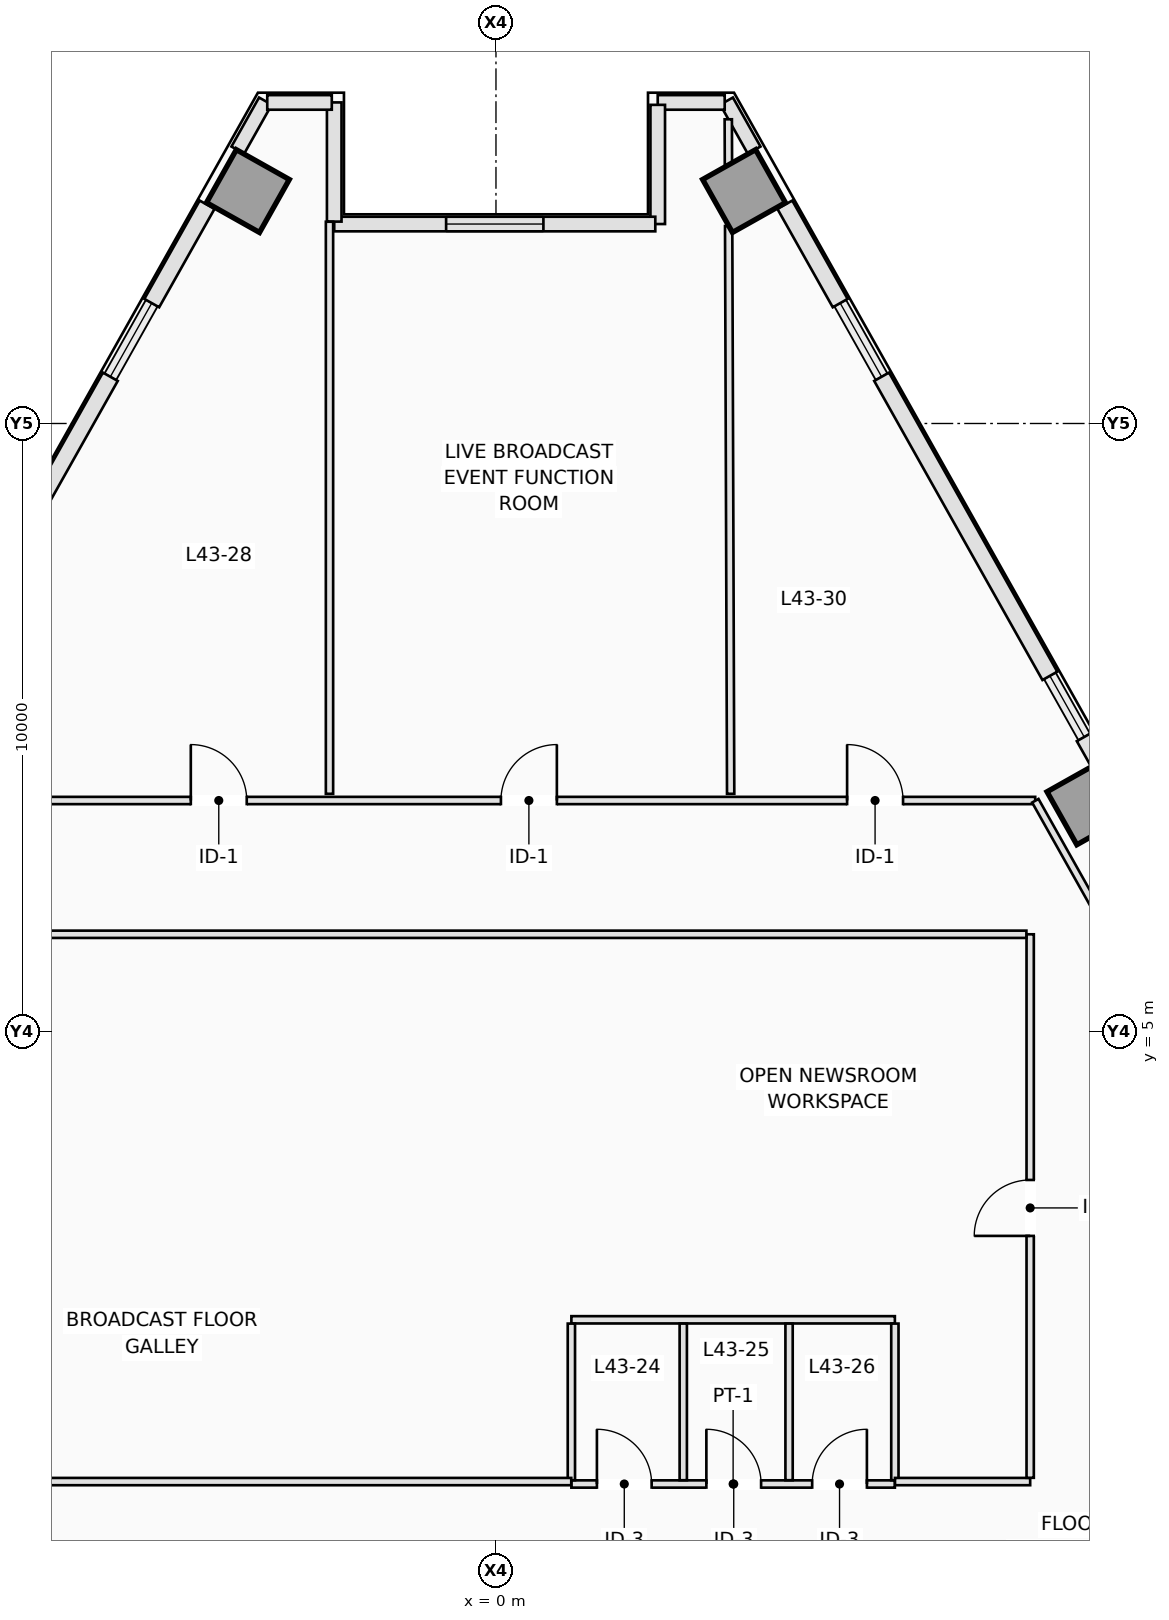
"""IFC4 building model, lengths in metres.
Left out: names, types, materials, properties, quantities, classifications, styles, units other than length and angle.
Written with IfcOpenShell. Run it as: python <this file> out.ifc"""

import sys

from ifc_helpers import new_model, si_unit, direction, frame, frame_2d, origin, origin_2d, place, context, subcontext, project, spatial, rectangle, extrude, element, fill, save


model = new_model("IFC4")
c1 = context("Model", 3, precision=1e-05, world=origin(), true_north=direction((0.0, 1.0)))
c2 = subcontext(c1, "Body", "Model", "MODEL_VIEW")
j1 = project(units=[si_unit("LENGTHUNIT", "METRE"), si_unit("PLANEANGLEUNIT", "RADIAN")], contexts=[c1])
p1 = place(None, origin())
s1 = spatial("IfcSite", under=j1, at=p1, CompositionType="ELEMENT")
p2 = place(p1, origin())
s2 = spatial("IfcBuilding", under=s1, at=p2, CompositionType="ELEMENT")
p3 = place(p2, frame((0.0, 0.0, 158.0)))
s3 = spatial("IfcBuildingStorey", under=s2, at=p3, CompositionType="ELEMENT", Elevation=158.0)
for number, where, z_axis, x_axis in (
    (1, (9.743, 8.753, 0.0), (0.0, 0.0, 1.0), (0.872, 0.49, 0.0)),
    (2, (4.079, 18.822, 0.0), (0.0, 0.0, 1.0), (0.872, 0.49, 0.0)),
    (3, (-4.079, 18.822, 0.0), (0.0, 0.0, 1.0), (-0.872, 0.49, 0.0)),
):
    element("IfcColumn", number, at=place(p3, frame(where, z_axis=z_axis, x_axis=x_axis)), inside=s3, PredefinedType="COLUMN", context=c2, shape_type="SweptSolid", body=[
        extrude(rectangle(XDim=1.0, YDim=1.0, at=origin_2d()), origin(), (0.0, 0.0, 1.0), 3.5),
    ])
p4 = place(p3, frame((3.792, 20.302, 0.0), z_axis=(0.0, 0.0, 1.0), x_axis=(0.490048346303, -0.871695255399, 0.0)))
e4 = element("IfcWall", 4, at=p4, inside=s3, PredefinedType="STANDARD", context=c2, shape_type="SweptSolid", body=[
    extrude(rectangle(XDim=0.926, YDim=0.24, at=frame_2d((0.463, 0.0))), origin(), (0.0, 0.0, 1.0), 3.25),
])
p5 = place(p3, frame((4.751, 18.597, 0.0), z_axis=(0.0, 0.0, 1.0), x_axis=(0.490248749158, -0.871582562899, 0.0)))
e5 = element("IfcWall", 5, at=p5, inside=s3, PredefinedType="STANDARD", context=c2, shape_type="SweptSolid", body=[
    extrude(rectangle(XDim=1.856, YDim=0.28, at=frame_2d((0.928, 0.0))), origin(), (0.0, 0.0, 1.0), 3.25),
])
p6 = place(p3, frame((6.342, 15.768, 0.0), z_axis=(0.0, 0.0, 1.0), x_axis=(0.490289995219, -0.871559361483, 0.0)))
e6 = element("IfcWall", 6, at=p6, inside=s3, PredefinedType="STANDARD", context=c2, shape_type="SweptSolid", body=[
    extrude(rectangle(XDim=5.643, YDim=0.28, at=frame_2d((2.822, 0.0))), origin(), (0.0, 0.0, 1.0), 3.25),
])
p7 = place(p3, frame((9.674, 9.845, 0.0), z_axis=(0.0, 0.0, 1.0), x_axis=(0.490412424957, -0.871490478116, 0.0)))
e7 = element("IfcWall", 7, at=p7, inside=s3, PredefinedType="STANDARD", context=c2, shape_type="SweptSolid", body=[
    extrude(rectangle(XDim=0.46, YDim=0.28, at=frame_2d((0.23, 0.0))), origin(), (0.0, 0.0, 1.0), 3.25),
])
p8 = place(p3, frame((-4.246, 19.495, 0.0), z_axis=(0.0, 0.0, 1.0), x_axis=(0.490048346303, 0.871695255399, 0.0)))
e8 = element("IfcWall", 8, at=p8, inside=s3, PredefinedType="STANDARD", context=c2, shape_type="SweptSolid", body=[
    extrude(rectangle(XDim=0.926, YDim=0.24, at=frame_2d((0.463, 0.0))), origin(), (0.0, 0.0, 1.0), 3.25),
])
p9 = place(p3, frame((-9.109, 10.85, 0.0), z_axis=(0.0, 0.0, 1.0), x_axis=(0.490289995219, 0.871559361483, 0.0)))
e9 = element("IfcWall", 9, at=p9, inside=s3, PredefinedType="STANDARD", context=c2, shape_type="SweptSolid", body=[
    extrude(rectangle(XDim=5.643, YDim=0.28, at=frame_2d((2.822, 0.0))), origin(), (0.0, 0.0, 1.0), 3.25),
])
p10 = place(p3, frame((-5.661, 16.98, 0.0), z_axis=(0.0, 0.0, 1.0), x_axis=(0.490248749158, 0.871582562899, 0.0)))
e10 = element("IfcWall", 10, at=p10, inside=s3, PredefinedType="STANDARD", context=c2, shape_type="SweptSolid", body=[
    extrude(rectangle(XDim=1.856, YDim=0.28, at=frame_2d((0.928, 0.0))), origin(), (0.0, 0.0, 1.0), 3.25),
])
p11 = place(p3, frame((3.761, 20.28, 0.0), z_axis=(0.0, 0.0, 1.0), x_axis=(-1.0, 0.0, 0.0)))
e11 = element("IfcWall", 11, at=p11, inside=s3, PredefinedType="STANDARD", context=c2, shape_type="SweptSolid", body=[
    extrude(rectangle(XDim=1.102, YDim=0.24, at=frame_2d((0.551, 0.0))), origin(), (0.0, 0.0, 1.0), 3.25),
])
p12 = place(p3, frame((2.66, 20.24, 0.0), z_axis=(0.0, 0.0, 1.0), x_axis=(0.0, -1.0, 0.0)))
e12 = element("IfcWall", 12, at=p12, inside=s3, PredefinedType="STANDARD", context=c2, shape_type="SweptSolid", body=[
    extrude(rectangle(XDim=1.96, YDim=0.24, at=frame_2d((0.98, 0.0))), origin(), (0.0, 0.0, 1.0), 3.25),
])
p13 = place(p3, frame((2.62, 18.28, 0.0), z_axis=(0.0, 0.0, 1.0), x_axis=(-1.0, 0.0, 0.0)))
e13 = element("IfcWall", 13, at=p13, inside=s3, PredefinedType="STANDARD", context=c2, shape_type="SweptSolid", body=[
    extrude(rectangle(XDim=5.28, YDim=0.24, at=frame_2d((2.64, 0.0))), origin(), (0.0, 0.0, 1.0), 3.25),
])
p14 = place(p13, frame((1.84, 0.0, 0.9)))
e14 = element("IfcOpeningElement", 14, at=p14, cuts=e13, PredefinedType="OPENING", context=c2, shape_type="SweptSolid", body=[
    extrude(rectangle(XDim=1.6, YDim=2.1, at=frame_2d((0.8, 1.05))), frame((0.0, 0.13, 0.0), z_axis=(0.0, -1.0, 0.0), x_axis=(1.0, 0.0, 0.0)), (0.0, 0.0, 1.0), 0.26),
])
p15 = place(p3, frame((-2.66, 18.32, 0.0), z_axis=(0.0, 0.0, 1.0), x_axis=(0.0, 1.0, 0.0)))
e15 = element("IfcWall", 15, at=p15, inside=s3, PredefinedType="STANDARD", context=c2, shape_type="SweptSolid", body=[
    extrude(rectangle(XDim=1.96, YDim=0.24, at=frame_2d((0.98, 0.0))), origin(), (0.0, 0.0, 1.0), 3.25),
])
p16 = place(p3, frame((-2.7, 20.28, 0.0), z_axis=(0.0, 0.0, 1.0), x_axis=(-1.0, 0.0, 0.0)))
e16 = element("IfcWall", 16, at=p16, inside=s3, PredefinedType="STANDARD", context=c2, shape_type="SweptSolid", body=[
    extrude(rectangle(XDim=1.062, YDim=0.24, at=frame_2d((0.531, 0.0))), origin(), (0.0, 0.0, 1.0), 3.25),
])
p17 = place(p3, frame((1.24, -2.44, 0.0), z_axis=(0.0, 0.0, 1.0), x_axis=(1.0, 0.0, 0.0)))
e17 = element("IfcWall", 17, at=p17, inside=s3, PredefinedType="PARTITIONING", context=c2, shape_type="SweptSolid", body=[
    extrude(rectangle(XDim=5.32, YDim=0.12, at=frame_2d((2.66, 0.0))), origin(), (0.0, 0.0, 1.0), 2.891),
])
p18 = place(p17, frame((0.42, 0.0, 0.0)))
e18 = element("IfcOpeningElement", 18, at=p18, cuts=e17, PredefinedType="OPENING", context=c2, shape_type="SweptSolid", body=[
    extrude(rectangle(XDim=0.9, YDim=2.12, at=frame_2d((0.45, 1.06))), frame((0.0, 0.07, 0.0), z_axis=(0.0, -1.0, 0.0), x_axis=(1.0, 0.0, 0.0)), (0.0, 0.0, 1.0), 0.14),
])
p19 = place(p17, frame((2.22, 0.0, 0.0)))
e19 = element("IfcOpeningElement", 19, at=p19, cuts=e17, PredefinedType="OPENING", context=c2, shape_type="SweptSolid", body=[
    extrude(rectangle(XDim=0.9, YDim=2.12, at=frame_2d((0.45, 1.06))), frame((0.0, 0.07, 0.0), z_axis=(0.0, -1.0, 0.0), x_axis=(1.0, 0.0, 0.0)), (0.0, 0.0, 1.0), 0.14),
])
p20 = place(p17, frame((3.96, 0.0, 0.0)))
e20 = element("IfcOpeningElement", 20, at=p20, cuts=e17, PredefinedType="OPENING", context=c2, shape_type="SweptSolid", body=[
    extrude(rectangle(XDim=0.9, YDim=2.12, at=frame_2d((0.45, 1.06))), frame((0.0, 0.07, 0.0), z_axis=(0.0, -1.0, 0.0), x_axis=(1.0, 0.0, 0.0)), (0.0, 0.0, 1.0), 0.14),
])
p21 = place(p3, frame((1.24, 0.26, 0.0), z_axis=(0.0, 0.0, 1.0), x_axis=(1.0, 0.0, 0.0)))
e21 = element("IfcWall", 21, at=p21, inside=s3, PredefinedType="PARTITIONING", context=c2, shape_type="SweptSolid", body=[
    extrude(rectangle(XDim=5.32, YDim=0.12, at=frame_2d((2.66, 0.0))), origin(), (0.0, 0.0, 1.0), 3.25),
])
for number, where, z_axis, x_axis in (
    (22, (1.24, -2.378, 0.0), (0.0, 0.0, 1.0), (0.0, 1.0, 0.0)),
    (23, (3.08, -2.378, 0.0), (0.0, 0.0, 1.0), (0.0, 1.0, 0.0)),
    (24, (4.82, -2.378, 0.0), (0.0, 0.0, 1.0), (0.0, 1.0, 0.0)),
    (25, (6.56, -2.378, 0.0), (0.0, 0.0, 1.0), (0.0, 1.0, 0.0)),
):
    element("IfcWall", number, at=place(p3, frame(where, z_axis=z_axis, x_axis=x_axis)), inside=s3, PredefinedType="PARTITIONING", context=c2, shape_type="SweptSolid", body=[
        extrude(rectangle(XDim=2.576, YDim=0.12, at=frame_2d((1.288, 0.0))), origin(), (0.0, 0.0, 1.0), 3.25),
    ])
p22 = place(p3, frame((-8.864, 8.8, 0.0), z_axis=(0.0, 0.0, 1.0), x_axis=(1.0, 0.0, 0.0)))
e26 = element("IfcWall", 26, at=p22, inside=s3, PredefinedType="PARTITIONING", context=c2, shape_type="SweptSolid", body=[
    extrude(rectangle(XDim=17.731, YDim=0.12, at=frame_2d((8.866, 0.0))), origin(), (0.0, 0.0, 1.0), 3.25),
])
p23 = place(p22, frame((3.845, 0.0, 0.0)))
e27 = element("IfcOpeningElement", 27, at=p23, cuts=e26, PredefinedType="OPENING", context=c2, shape_type="SweptSolid", body=[
    extrude(rectangle(XDim=0.92, YDim=2.12, at=frame_2d((0.46, 1.06))), frame((0.0, 0.07, 0.0), z_axis=(0.0, -1.0, 0.0), x_axis=(1.0, 0.0, 0.0)), (0.0, 0.0, 1.0), 0.14),
])
p24 = place(p22, frame((8.945, 0.0, 0.0)))
e28 = element("IfcOpeningElement", 28, at=p24, cuts=e26, PredefinedType="OPENING", context=c2, shape_type="SweptSolid", body=[
    extrude(rectangle(XDim=0.92, YDim=2.12, at=frame_2d((0.46, 1.06))), frame((0.0, 0.07, 0.0), z_axis=(0.0, -1.0, 0.0), x_axis=(1.0, 0.0, 0.0)), (0.0, 0.0, 1.0), 0.14),
])
p25 = place(p22, frame((14.638, 0.0, 0.0)))
e29 = element("IfcOpeningElement", 29, at=p25, cuts=e26, PredefinedType="OPENING", context=c2, shape_type="SweptSolid", body=[
    extrude(rectangle(XDim=0.92, YDim=2.12, at=frame_2d((0.46, 1.06))), frame((0.0, 0.07, 0.0), z_axis=(0.0, -1.0, 0.0), x_axis=(1.0, 0.0, 0.0)), (0.0, 0.0, 1.0), 0.14),
])
p26 = place(p3, frame((8.87, 8.796, 0.0), z_axis=(0.0, 0.0, 1.0), x_axis=(0.490296163189, -0.871555891703, 0.0)))
e30 = element("IfcWall", 30, at=p26, inside=s3, PredefinedType="PARTITIONING", context=c2, shape_type="SweptSolid", body=[
    extrude(rectangle(XDim=4.315, YDim=0.12, at=frame_2d((2.157, 0.0))), origin(), (0.0, 0.0, 1.0), 3.25),
])
p27 = place(p3, frame((-8.515, -2.4, 0.0), z_axis=(0.0, 0.0, 1.0), x_axis=(1.0, 0.0, 0.0)))
e31 = element("IfcWall", 31, at=p27, inside=s3, PredefinedType="PARTITIONING", context=c2, shape_type="SweptSolid", body=[
    extrude(rectangle(XDim=9.753, YDim=0.12, at=frame_2d((4.876, 0.0))), origin(), (0.0, 0.0, 1.0), 2.891),
])
p28 = place(p3, frame((6.562, -2.4, 0.0), z_axis=(0.0, 0.0, 1.0), x_axis=(1.0, 0.0, 0.0)))
e32 = element("IfcWall", 32, at=p28, inside=s3, PredefinedType="PARTITIONING", context=c2, shape_type="SweptSolid", body=[
    extrude(rectangle(XDim=2.223, YDim=0.12, at=frame_2d((1.111, 0.0))), origin(), (0.0, 0.0, 1.0), 3.25),
])
p29 = place(p3, frame((8.785, -2.338, 0.0), z_axis=(0.0, 0.0, 1.0), x_axis=(0.0, 1.0, 0.0)))
e33 = element("IfcWall", 33, at=p29, inside=s3, PredefinedType="PARTITIONING", context=c2, shape_type="SweptSolid", body=[
    extrude(rectangle(XDim=8.938, YDim=0.12, at=frame_2d((4.469, 0.0))), origin(), (0.0, 0.0, 1.0), 3.25),
])
p30 = place(p29, frame((3.978, 0.0, 0.0)))
e34 = element("IfcOpeningElement", 34, at=p30, cuts=e33, PredefinedType="OPENING", context=c2, shape_type="SweptSolid", body=[
    extrude(rectangle(XDim=0.92, YDim=2.12, at=frame_2d((0.46, 1.06))), frame((0.0, 0.07, 0.0), z_axis=(0.0, -1.0, 0.0), x_axis=(1.0, 0.0, 0.0)), (0.0, 0.0, 1.0), 0.14),
])
p31 = place(p3, frame((8.723, 6.6, 0.0), z_axis=(0.0, 0.0, 1.0), x_axis=(-1.0, 0.0, 0.0)))
e35 = element("IfcWall", 35, at=p31, inside=s3, PredefinedType="PARTITIONING", context=c2, shape_type="SweptSolid", body=[
    extrude(rectangle(XDim=17.238, YDim=0.12, at=frame_2d((8.619, 0.0))), origin(), (0.0, 0.0, 1.0), 2.891),
])
p32 = place(p3, frame((-2.738, 18.318, 0.0), z_axis=(0.0, 0.0, 1.0), x_axis=(0.0, -1.0, 0.0)))
e36 = element("IfcWall", 36, at=p32, inside=s3, PredefinedType="PARTITIONING", context=c2, shape_type="SweptSolid", body=[
    extrude(rectangle(XDim=9.408, YDim=0.12, at=frame_2d((4.704, 0.0))), origin(), (0.0, 0.0, 1.0), 3.25),
])
p33 = place(p3, frame((3.82, 20.003, 0.0), z_axis=(0.0, 0.0, 1.0), x_axis=(0.00358654361, -0.999993568332, 0.0)))
e37 = element("IfcWall", 37, at=p33, inside=s3, PredefinedType="PARTITIONING", context=c2, shape_type="SweptSolid", body=[
    extrude(rectangle(XDim=0.749, YDim=0.12, at=frame_2d((0.375, 0.0))), origin(), (0.0, 0.0, 1.0), 3.25),
])
p34 = place(p3, frame((3.826, 18.248, 0.0), z_axis=(0.0, 0.0, 1.0), x_axis=(0.003529574333, -0.999993771033, 0.0)))
e38 = element("IfcWall", 38, at=p34, inside=s3, PredefinedType="PARTITIONING", context=c2, shape_type="SweptSolid", body=[
    extrude(rectangle(XDim=9.338, YDim=0.12, at=frame_2d((4.669, 0.0))), origin(), (0.0, 0.0, 1.0), 2.717),
])
p35 = place(p14, origin())
e39 = element("IfcWindow", 39, at=p35, inside=s3, PartitioningType="SINGLE_PANEL", PredefinedType="WINDOW", context=c2, shape_type="SweptSolid", body=[
    extrude(rectangle(XDim=1.6, YDim=2.1, at=frame_2d((0.8, 1.05))), frame((0.0, 0.03, 0.0), z_axis=(0.0, -1.0, 0.0), x_axis=(1.0, 0.0, 0.0)), (0.0, 0.0, 1.0), 0.06),
])
fill(e14, e39)
p36 = place(p18, origin())
e40 = element("IfcDoor", 40, at=p36, inside=s3, OperationType="SINGLE_SWING_LEFT", PredefinedType="DOOR", context=c2, shape_type="SweptSolid", body=[
    extrude(rectangle(XDim=0.9, YDim=2.12, at=frame_2d((0.45, 1.06))), frame((0.0, 0.025, 0.0), z_axis=(0.0, -1.0, 0.0), x_axis=(1.0, 0.0, 0.0)), (0.0, 0.0, 1.0), 0.05),
])
fill(e18, e40)
p37 = place(p19, origin())
e41 = element("IfcDoor", 41, at=p37, inside=s3, OperationType="SINGLE_SWING_LEFT", PredefinedType="DOOR", context=c2, shape_type="SweptSolid", body=[
    extrude(rectangle(XDim=0.9, YDim=2.12, at=frame_2d((0.45, 1.06))), frame((0.0, 0.025, 0.0), z_axis=(0.0, -1.0, 0.0), x_axis=(1.0, 0.0, 0.0)), (0.0, 0.0, 1.0), 0.05),
])
fill(e19, e41)
p38 = place(p20, origin())
e42 = element("IfcDoor", 42, at=p38, inside=s3, OperationType="SINGLE_SWING_RIGHT", PredefinedType="DOOR", context=c2, shape_type="SweptSolid", body=[
    extrude(rectangle(XDim=0.9, YDim=2.12, at=frame_2d((0.45, 1.06))), frame((0.0, 0.025, 0.0), z_axis=(0.0, -1.0, 0.0), x_axis=(1.0, 0.0, 0.0)), (0.0, 0.0, 1.0), 0.05),
])
fill(e20, e42)
p39 = place(p23, origin())
e43 = element("IfcDoor", 43, at=p39, inside=s3, OperationType="SINGLE_SWING_LEFT", PredefinedType="DOOR", context=c2, shape_type="SweptSolid", body=[
    extrude(rectangle(XDim=0.92, YDim=2.12, at=frame_2d((0.46, 1.06))), frame((0.0, 0.025, 0.0), z_axis=(0.0, -1.0, 0.0), x_axis=(1.0, 0.0, 0.0)), (0.0, 0.0, 1.0), 0.05),
])
fill(e27, e43)
p40 = place(p24, origin())
e44 = element("IfcDoor", 44, at=p40, inside=s3, OperationType="SINGLE_SWING_RIGHT", PredefinedType="DOOR", context=c2, shape_type="SweptSolid", body=[
    extrude(rectangle(XDim=0.92, YDim=2.12, at=frame_2d((0.46, 1.06))), frame((0.0, 0.025, 0.0), z_axis=(0.0, -1.0, 0.0), x_axis=(1.0, 0.0, 0.0)), (0.0, 0.0, 1.0), 0.05),
])
fill(e28, e44)
p41 = place(p25, origin())
e45 = element("IfcDoor", 45, at=p41, inside=s3, OperationType="SINGLE_SWING_LEFT", PredefinedType="DOOR", context=c2, shape_type="SweptSolid", body=[
    extrude(rectangle(XDim=0.92, YDim=2.12, at=frame_2d((0.46, 1.06))), frame((0.0, 0.025, 0.0), z_axis=(0.0, -1.0, 0.0), x_axis=(1.0, 0.0, 0.0)), (0.0, 0.0, 1.0), 0.05),
])
fill(e29, e45)
p42 = place(p30, origin())
e46 = element("IfcDoor", 46, at=p42, inside=s3, OperationType="SINGLE_SWING_LEFT", PredefinedType="DOOR", context=c2, shape_type="SweptSolid", body=[
    extrude(rectangle(XDim=0.92, YDim=2.12, at=frame_2d((0.46, 1.06))), frame((0.0, 0.025, 0.0), z_axis=(0.0, -1.0, 0.0), x_axis=(1.0, 0.0, 0.0)), (0.0, 0.0, 1.0), 0.05),
])
fill(e34, e46)
save(model, sys.argv[1])
